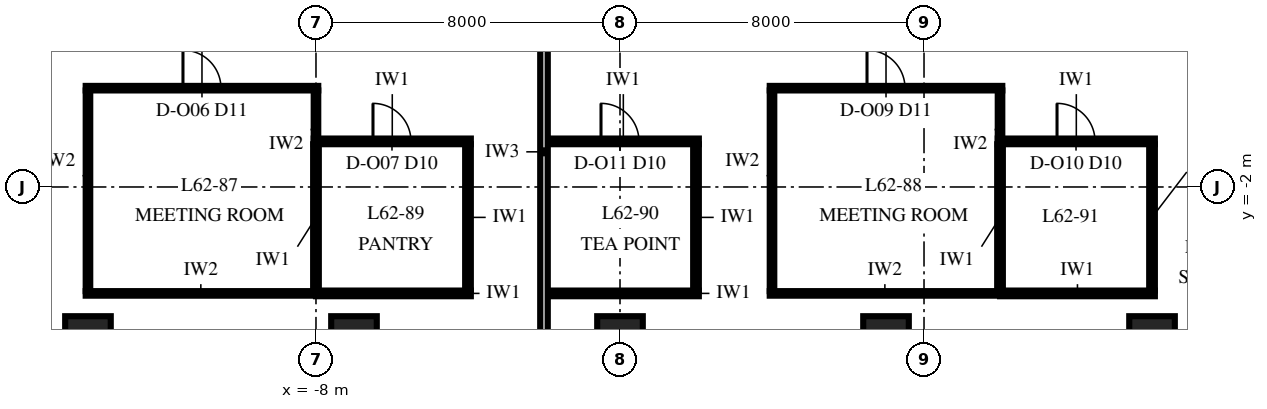
"""IFC4 building model, lengths in metres.
Left out: names, types, materials, properties, quantities, classifications, styles, units other than length and angle.
Written with IfcOpenShell. Run it as: python <this file> out.ifc"""

import sys

from ifc_helpers import new_model, si_unit, direction, frame, frame_2d, origin, origin_2d, place, context, subcontext, project, spatial, rectangle, extrude, element, fill, save


model = new_model("IFC4")
c1 = context("Model", 3, precision=1e-05, world=origin(), true_north=direction((0.0, 1.0)))
c2 = subcontext(c1, "Body", "Model", "MODEL_VIEW")
j1 = project(units=[si_unit("LENGTHUNIT", "METRE"), si_unit("PLANEANGLEUNIT", "RADIAN")], contexts=[c1])
p1 = place(None, origin())
s1 = spatial("IfcSite", under=j1, at=p1, CompositionType="ELEMENT")
p2 = place(p1, origin())
s2 = spatial("IfcBuilding", under=s1, at=p2, CompositionType="ELEMENT")
p3 = place(p2, frame((0.0, 0.0, 268.0)))
s3 = spatial("IfcBuildingStorey", under=s2, at=p3, CompositionType="ELEMENT", Elevation=268.0)
for number, where, z_axis, x_axis in (
    (1, (-14.0, -6.0, 0.0), (0.0, 0.0, 1.0), (1.0, 0.0, 0.0)),
    (2, (-7.0, -6.0, 0.0), (0.0, 0.0, 1.0), (1.0, 0.0, 0.0)),
    (3, (0.0, -6.0, 0.0), (0.0, 0.0, 1.0), (1.0, 0.0, 0.0)),
    (4, (7.0, -6.0, 0.0), (0.0, 0.0, 1.0), (1.0, 0.0, 0.0)),
    (5, (14.0, -6.0, 0.0), (0.0, 0.0, 1.0), (1.0, 0.0, 0.0)),
):
    element("IfcColumn", number, at=place(p3, frame(where, z_axis=z_axis, x_axis=x_axis)), inside=s3, PredefinedType="COLUMN", context=c2, shape_type="SweptSolid", body=[
        extrude(rectangle(XDim=1.2, YDim=1.2, at=origin_2d()), origin(), (0.0, 0.0, 1.0), 4.0),
    ])
p4 = place(p3, frame((-14.06, -4.8, 0.0), z_axis=(0.0, 0.0, 1.0), x_axis=(1.0, 0.0, 0.0)))
e6 = element("IfcWall", 6, at=p4, inside=s3, PredefinedType="PARTITIONING", context=c2, shape_type="SweptSolid", body=[
    extrude(rectangle(XDim=6.06, YDim=0.12, at=frame_2d((3.03, 0.0))), origin(), (0.0, 0.0, 1.0), 3.23),
])
p5 = place(p3, frame((-8.0, -4.8, 0.0), z_axis=(0.0, 0.0, 1.0), x_axis=(1.0, 0.0, 0.0)))
e7 = element("IfcWall", 7, at=p5, inside=s3, PredefinedType="PARTITIONING", context=c2, shape_type="SweptSolid", body=[
    extrude(rectangle(XDim=4.075, YDim=0.15, at=frame_2d((2.038, 0.0))), origin(), (0.0, 0.0, 1.0), 3.23),
])
p6 = place(p3, frame((-1.9, -4.8, 0.0), z_axis=(0.0, 0.0, 1.0), x_axis=(1.0, 0.0, 0.0)))
e8 = element("IfcWall", 8, at=p6, inside=s3, PredefinedType="PARTITIONING", context=c2, shape_type="SweptSolid", body=[
    extrude(rectangle(XDim=3.975, YDim=0.15, at=frame_2d((1.987, 0.0))), origin(), (0.0, 0.0, 1.0), 3.23),
])
p7 = place(p3, frame((3.94, -4.8, 0.0), z_axis=(0.0, 0.0, 1.0), x_axis=(1.0, 0.0, 0.0)))
e9 = element("IfcWall", 9, at=p7, inside=s3, PredefinedType="PARTITIONING", context=c2, shape_type="SweptSolid", body=[
    extrude(rectangle(XDim=6.06, YDim=0.12, at=frame_2d((3.03, 0.0))), origin(), (0.0, 0.0, 1.0), 3.23),
])
p8 = place(p3, frame((10.0, -4.8, 0.0), z_axis=(0.0, 0.0, 1.0), x_axis=(1.0, 0.0, 0.0)))
e10 = element("IfcWall", 10, at=p8, inside=s3, PredefinedType="PARTITIONING", context=c2, shape_type="SweptSolid", body=[
    extrude(rectangle(XDim=4.075, YDim=0.15, at=frame_2d((2.038, 0.0))), origin(), (0.0, 0.0, 1.0), 3.23),
])
p9 = place(p3, frame((-8.06, -0.8, 0.0), z_axis=(0.0, 0.0, 1.0), x_axis=(1.0, 0.0, 0.0)))
e11 = element("IfcWall", 11, at=p9, inside=s3, PredefinedType="PARTITIONING", context=c2, shape_type="SweptSolid", body=[
    extrude(rectangle(XDim=4.135, YDim=0.15, at=frame_2d((2.067, 0.0))), origin(), (0.0, 0.0, 1.0), 3.23),
])
p10 = place(p9, frame((1.56, 0.0, 0.0)))
e12 = element("IfcOpeningElement", 12, at=p10, cuts=e11, PredefinedType="OPENING", context=c2, shape_type="SweptSolid", body=[
    extrude(rectangle(XDim=1.0, YDim=2.3, at=frame_2d((0.5, 1.15))), frame((0.0, 0.09, 0.0), z_axis=(0.0, -1.0, 0.0), x_axis=(1.0, 0.0, 0.0)), (0.0, 0.0, 1.0), 0.18),
])
p11 = place(p3, frame((-1.9, -0.8, 0.0), z_axis=(0.0, 0.0, 1.0), x_axis=(1.0, 0.0, 0.0)))
e13 = element("IfcWall", 13, at=p11, inside=s3, PredefinedType="PARTITIONING", context=c2, shape_type="SweptSolid", body=[
    extrude(rectangle(XDim=3.975, YDim=0.15, at=frame_2d((1.987, 0.0))), origin(), (0.0, 0.0, 1.0), 3.85),
])
p12 = place(p11, frame((1.4, 0.0, 0.0)))
e14 = element("IfcOpeningElement", 14, at=p12, cuts=e13, PredefinedType="OPENING", context=c2, shape_type="SweptSolid", body=[
    extrude(rectangle(XDim=1.0, YDim=2.3, at=frame_2d((0.5, 1.15))), frame((0.0, 0.09, 0.0), z_axis=(0.0, -1.0, 0.0), x_axis=(1.0, 0.0, 0.0)), (0.0, 0.0, 1.0), 0.18),
])
p13 = place(p3, frame((9.94, -0.8, 0.0), z_axis=(0.0, 0.0, 1.0), x_axis=(1.0, 0.0, 0.0)))
e15 = element("IfcWall", 15, at=p13, inside=s3, PredefinedType="PARTITIONING", context=c2, shape_type="SweptSolid", body=[
    extrude(rectangle(XDim=4.135, YDim=0.15, at=frame_2d((2.067, 0.0))), origin(), (0.0, 0.0, 1.0), 3.23),
])
p14 = place(p13, frame((1.56, 0.0, 0.0)))
e16 = element("IfcOpeningElement", 16, at=p14, cuts=e15, PredefinedType="OPENING", context=c2, shape_type="SweptSolid", body=[
    extrude(rectangle(XDim=1.0, YDim=2.3, at=frame_2d((0.5, 1.15))), frame((0.0, 0.09, 0.0), z_axis=(0.0, -1.0, 0.0), x_axis=(1.0, 0.0, 0.0)), (0.0, 0.0, 1.0), 0.18),
])
p15 = place(p3, frame((-14.06, 0.6, 0.0), z_axis=(0.0, 0.0, 1.0), x_axis=(1.0, 0.0, 0.0)))
e17 = element("IfcWall", 17, at=p15, inside=s3, PredefinedType="PARTITIONING", context=c2, shape_type="SweptSolid", body=[
    extrude(rectangle(XDim=6.12, YDim=0.12, at=frame_2d((3.06, 0.0))), origin(), (0.0, 0.0, 1.0), 3.23),
])
p16 = place(p15, frame((2.56, 0.0, 0.0)))
e18 = element("IfcOpeningElement", 18, at=p16, cuts=e17, PredefinedType="OPENING", context=c2, shape_type="SweptSolid", body=[
    extrude(rectangle(XDim=1.0, YDim=2.4, at=frame_2d((0.5, 1.2))), frame((0.0, 0.075, 0.0), z_axis=(0.0, -1.0, 0.0), x_axis=(1.0, 0.0, 0.0)), (0.0, 0.0, 1.0), 0.15),
])
p17 = place(p3, frame((3.94, 0.6, 0.0), z_axis=(0.0, 0.0, 1.0), x_axis=(1.0, 0.0, 0.0)))
e19 = element("IfcWall", 19, at=p17, inside=s3, PredefinedType="PARTITIONING", context=c2, shape_type="SweptSolid", body=[
    extrude(rectangle(XDim=6.12, YDim=0.12, at=frame_2d((3.06, 0.0))), origin(), (0.0, 0.0, 1.0), 3.23),
])
p18 = place(p17, frame((2.56, 0.0, 0.0)))
e20 = element("IfcOpeningElement", 20, at=p18, cuts=e19, PredefinedType="OPENING", context=c2, shape_type="SweptSolid", body=[
    extrude(rectangle(XDim=1.0, YDim=2.4, at=frame_2d((0.5, 1.2))), frame((0.0, 0.075, 0.0), z_axis=(0.0, -1.0, 0.0), x_axis=(1.0, 0.0, 0.0)), (0.0, 0.0, 1.0), 0.15),
])
p19 = place(p3, frame((-14.0, -4.74, 0.0), z_axis=(0.0, 0.0, 1.0), x_axis=(0.0, 1.0, 0.0)))
e21 = element("IfcWall", 21, at=p19, inside=s3, PredefinedType="PARTITIONING", context=c2, shape_type="SweptSolid", body=[
    extrude(rectangle(XDim=5.28, YDim=0.12, at=frame_2d((2.64, 0.0))), origin(), (0.0, 0.0, 1.0), 3.23),
])
p20 = place(p3, frame((-8.0, -4.725, 0.0), z_axis=(0.0, 0.0, 1.0), x_axis=(0.0, 1.0, 0.0)))
e22 = element("IfcWall", 22, at=p20, inside=s3, PredefinedType="PARTITIONING", context=c2, shape_type="SweptSolid", body=[
    extrude(rectangle(XDim=3.85, YDim=0.15, at=frame_2d((1.925, 0.0))), origin(), (0.0, 0.0, 1.0), 3.85),
])
p21 = place(p3, frame((-8.0, -0.725, 0.0), z_axis=(0.0, 0.0, 1.0), x_axis=(0.0, 1.0, 0.0)))
e23 = element("IfcWall", 23, at=p21, inside=s3, PredefinedType="PARTITIONING", context=c2, shape_type="SweptSolid", body=[
    extrude(rectangle(XDim=1.265, YDim=0.12, at=frame_2d((0.633, 0.0))), origin(), (0.0, 0.0, 1.0), 3.85),
])
p22 = place(p3, frame((-4.0, -4.725, 0.0), z_axis=(0.0, 0.0, 1.0), x_axis=(0.0, 1.0, 0.0)))
e24 = element("IfcWall", 24, at=p22, inside=s3, PredefinedType="PARTITIONING", context=c2, shape_type="SweptSolid", body=[
    extrude(rectangle(XDim=3.85, YDim=0.15, at=frame_2d((1.925, 0.0))), origin(), (0.0, 0.0, 1.0), 3.85),
])
p23 = place(p3, frame((-2.0, -6.0, 0.0), z_axis=(0.0, 0.0, 1.0), x_axis=(0.0, 1.0, 0.0)))
e25 = element("IfcWall", 25, at=p23, inside=s3, PredefinedType="PARTITIONING", context=c2, shape_type="SweptSolid", body=[
    extrude(rectangle(XDim=9.85, YDim=0.2, at=frame_2d((4.925, 0.0))), origin(), (0.0, 0.0, 1.0), 2.85),
])
p24 = place(p3, frame((2.0, -4.725, 0.0), z_axis=(0.0, 0.0, 1.0), x_axis=(0.0, 1.0, 0.0)))
e26 = element("IfcWall", 26, at=p24, inside=s3, PredefinedType="PARTITIONING", context=c2, shape_type="SweptSolid", body=[
    extrude(rectangle(XDim=3.85, YDim=0.15, at=frame_2d((1.925, 0.0))), origin(), (0.0, 0.0, 1.0), 3.23),
])
p25 = place(p3, frame((4.0, -4.74, 0.0), z_axis=(0.0, 0.0, 1.0), x_axis=(0.0, 1.0, 0.0)))
e27 = element("IfcWall", 27, at=p25, inside=s3, PredefinedType="PARTITIONING", context=c2, shape_type="SweptSolid", body=[
    extrude(rectangle(XDim=5.28, YDim=0.12, at=frame_2d((2.64, 0.0))), origin(), (0.0, 0.0, 1.0), 3.85),
])
p26 = place(p3, frame((10.0, -4.725, 0.0), z_axis=(0.0, 0.0, 1.0), x_axis=(0.0, 1.0, 0.0)))
e28 = element("IfcWall", 28, at=p26, inside=s3, PredefinedType="PARTITIONING", context=c2, shape_type="SweptSolid", body=[
    extrude(rectangle(XDim=3.85, YDim=0.15, at=frame_2d((1.925, 0.0))), origin(), (0.0, 0.0, 1.0), 3.23),
])
p27 = place(p3, frame((10.0, -0.725, 0.0), z_axis=(0.0, 0.0, 1.0), x_axis=(0.0, 1.0, 0.0)))
e29 = element("IfcWall", 29, at=p27, inside=s3, PredefinedType="PARTITIONING", context=c2, shape_type="SweptSolid", body=[
    extrude(rectangle(XDim=1.265, YDim=0.12, at=frame_2d((0.633, 0.0))), origin(), (0.0, 0.0, 1.0), 3.85),
])
p28 = place(p3, frame((14.0, -4.725, 0.0), z_axis=(0.0, 0.0, 1.0), x_axis=(0.0, 1.0, 0.0)))
e30 = element("IfcWall", 30, at=p28, inside=s3, PredefinedType="PARTITIONING", context=c2, shape_type="SweptSolid", body=[
    extrude(rectangle(XDim=3.85, YDim=0.15, at=frame_2d((1.925, 0.0))), origin(), (0.0, 0.0, 1.0), 3.23),
])
p29 = place(p16, origin())
e31 = element("IfcDoor", 31, at=p29, inside=s3, OperationType="SINGLE_SWING_RIGHT", PredefinedType="DOOR", context=c2, shape_type="SweptSolid", body=[
    extrude(rectangle(XDim=1.0, YDim=2.4, at=frame_2d((0.5, 1.2))), frame((0.0, 0.06, 0.0), z_axis=(0.0, -1.0, 0.0), x_axis=(1.0, 0.0, 0.0)), (0.0, 0.0, 1.0), 0.12),
])
fill(e18, e31)
p30 = place(p10, origin())
e32 = element("IfcDoor", 32, at=p30, inside=s3, OperationType="SINGLE_SWING_LEFT", PredefinedType="DOOR", context=c2, shape_type="SweptSolid", body=[
    extrude(rectangle(XDim=1.0, YDim=2.3, at=frame_2d((0.5, 1.15))), frame((0.0, 0.075, 0.0), z_axis=(0.0, -1.0, 0.0), x_axis=(1.0, 0.0, 0.0)), (0.0, 0.0, 1.0), 0.149),
])
fill(e12, e32)
p31 = place(p18, origin())
e33 = element("IfcDoor", 33, at=p31, inside=s3, OperationType="SINGLE_SWING_RIGHT", PredefinedType="DOOR", context=c2, shape_type="SweptSolid", body=[
    extrude(rectangle(XDim=1.0, YDim=2.4, at=frame_2d((0.5, 1.2))), frame((0.0, 0.06, 0.0), z_axis=(0.0, -1.0, 0.0), x_axis=(1.0, 0.0, 0.0)), (0.0, 0.0, 1.0), 0.12),
])
fill(e20, e33)
p32 = place(p14, origin())
e34 = element("IfcDoor", 34, at=p32, inside=s3, OperationType="SINGLE_SWING_LEFT", PredefinedType="DOOR", context=c2, shape_type="SweptSolid", body=[
    extrude(rectangle(XDim=1.0, YDim=2.3, at=frame_2d((0.5, 1.15))), frame((0.0, 0.075, 0.0), z_axis=(0.0, -1.0, 0.0), x_axis=(1.0, 0.0, 0.0)), (0.0, 0.0, 1.0), 0.149),
])
fill(e16, e34)
p33 = place(p12, origin())
e35 = element("IfcDoor", 35, at=p33, inside=s3, OperationType="SINGLE_SWING_LEFT", PredefinedType="DOOR", context=c2, shape_type="SweptSolid", body=[
    extrude(rectangle(XDim=1.0, YDim=2.3, at=frame_2d((0.5, 1.15))), frame((0.0, 0.075, 0.0), z_axis=(0.0, -1.0, 0.0), x_axis=(1.0, 0.0, 0.0)), (0.0, 0.0, 1.0), 0.149),
])
fill(e14, e35)
save(model, sys.argv[1])
